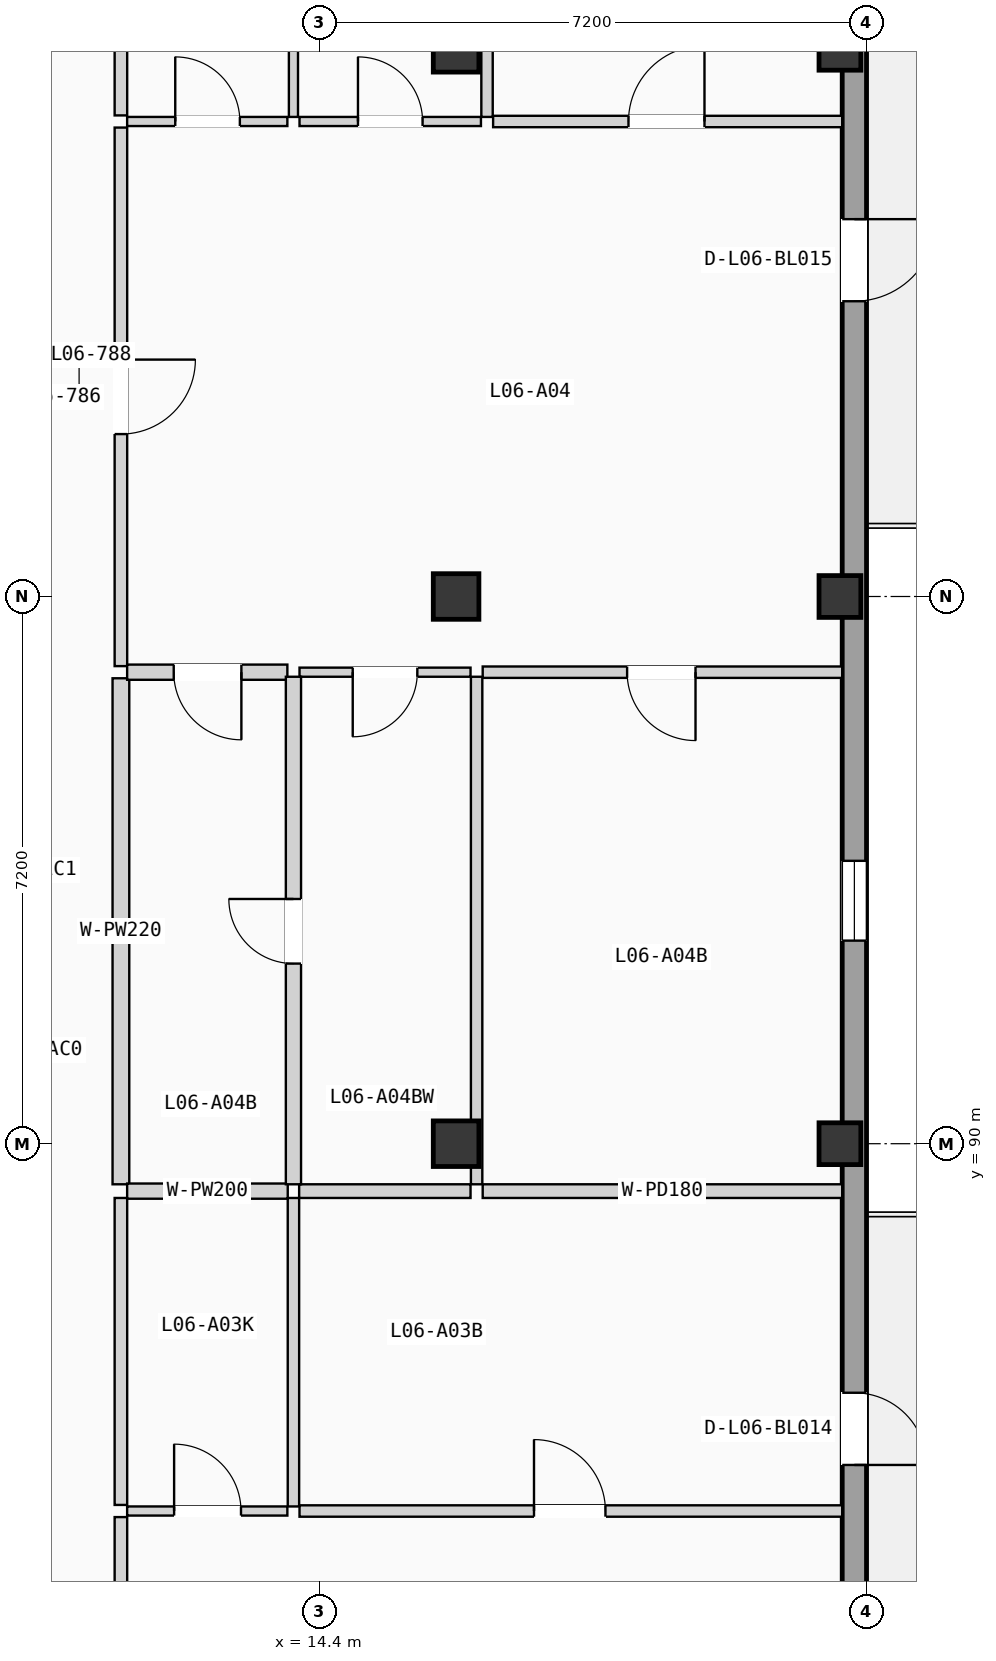
"""IFC4 building model, lengths in metres.
Left out: names, types, materials, properties, quantities, classifications, styles, units other than length and angle.
Written with IfcOpenShell. Run it as: python <this file> out.ifc"""

import sys

from ifc_helpers import new_model, si_unit, direction, frame, frame_2d, origin, origin_2d, place, context, subcontext, project, spatial, rectangle, extrude, element, fill, save


model = new_model("IFC4")
c1 = context("Model", 3, precision=1e-05, world=origin(), true_north=direction((0.0, 1.0)))
c2 = subcontext(c1, "Body", "Model", "MODEL_VIEW")
j1 = project(units=[si_unit("LENGTHUNIT", "METRE"), si_unit("PLANEANGLEUNIT", "RADIAN")], contexts=[c1])
p1 = place(None, origin())
s1 = spatial("IfcSite", under=j1, at=p1, CompositionType="ELEMENT")
p2 = place(p1, origin())
s2 = spatial("IfcBuilding", under=s1, at=p2, CompositionType="ELEMENT")
p3 = place(p2, frame((0.0, 0.0, 21.525)))
s3 = spatial("IfcBuildingStorey", under=s2, at=p3, CompositionType="ELEMENT", Elevation=21.525)
for number, where, z_axis, x_axis in (
    (1, (16.2, 90.0, 0.0), (0.0, 0.0, 1.0), (1.0, 0.0, 0.0)),
    (2, (16.2, 97.2, 0.0), (0.0, 0.0, 1.0), (1.0, 0.0, 0.0)),
    (3, (16.2, 104.4, 0.0), (0.0, 0.0, 1.0), (1.0, 0.0, 0.0)),
):
    element("IfcColumn", number, at=place(p3, frame(where, z_axis=z_axis, x_axis=x_axis)), inside=s3, PredefinedType="COLUMN", context=c2, shape_type="SweptSolid", body=[
        extrude(rectangle(XDim=0.6, YDim=0.6, at=origin_2d()), origin(), (0.0, 0.0, 1.0), 3.15),
    ])
for number, where, z_axis, x_axis in (
    (4, (21.25, 90.0, 0.0), (0.0, 0.0, 1.0), (1.0, 0.0, 0.0)),
    (5, (21.25, 97.2, 0.0), (0.0, 0.0, 1.0), (1.0, 0.0, 0.0)),
    (6, (21.25, 104.4, 0.0), (0.0, 0.0, 1.0), (1.0, 0.0, 0.0)),
):
    element("IfcColumn", number, at=place(p3, frame(where, z_axis=z_axis, x_axis=x_axis)), inside=s3, PredefinedType="COLUMN", context=c2, shape_type="SweptSolid", body=[
        extrude(rectangle(XDim=0.55, YDim=0.55, at=origin_2d()), origin(), (0.0, 0.0, 1.0), 3.15),
    ])
p4 = place(p3, frame((21.44, 68.72, 0.0), z_axis=(0.0, 0.0, 1.0), x_axis=(0.0, 1.0, 0.0)))
e7 = element("IfcWall", 7, at=p4, inside=s3, PredefinedType="SOLIDWALL", context=c2, shape_type="SweptSolid", body=[
    extrude(rectangle(XDim=49.76, YDim=0.32, at=frame_2d((24.88, 0.0))), origin(), (0.0, 0.0, 1.0), 2.89),
])
p5 = place(p4, frame((12.169, 0.0, 0.555)))
e8 = element("IfcOpeningElement", 8, at=p5, cuts=e7, PredefinedType="OPENING", context=c2, shape_type="SweptSolid", body=[
    extrude(rectangle(XDim=0.95, YDim=1.65, at=frame_2d((0.475, 0.825))), frame((0.0, 0.17, 0.0), z_axis=(0.0, -1.0, 0.0), x_axis=(1.0, 0.0, 0.0)), (0.0, 0.0, 1.0), 0.34),
])
p6 = place(p4, frame((8.825, 0.0, 0.85)))
e9 = element("IfcOpeningElement", 9, at=p6, cuts=e7, PredefinedType="OPENING", context=c2, shape_type="SweptSolid", body=[
    extrude(rectangle(XDim=0.95, YDim=1.2, at=frame_2d((0.475, 0.6))), frame((0.0, 0.17, 0.0), z_axis=(0.0, -1.0, 0.0), x_axis=(1.0, 0.0, 0.0)), (0.0, 0.0, 1.0), 0.34),
])
p7 = place(p4, frame((17.053, 0.0, 0.0)))
e10 = element("IfcOpeningElement", 10, at=p7, cuts=e7, PredefinedType="OPENING", context=c2, shape_type="SweptSolid", body=[
    extrude(rectangle(XDim=0.95, YDim=2.15, at=frame_2d((0.475, 1.075))), frame((0.0, 0.17, 0.0), z_axis=(0.0, -1.0, 0.0), x_axis=(1.0, 0.0, 0.0)), (0.0, 0.0, 1.0), 0.34),
])
p8 = place(p4, frame((32.365, 0.0, 0.0)))
e11 = element("IfcOpeningElement", 11, at=p8, cuts=e7, PredefinedType="OPENING", context=c2, shape_type="SweptSolid", body=[
    extrude(rectangle(XDim=1.08, YDim=2.18, at=frame_2d((0.54, 1.09))), frame((0.0, 0.17, 0.0), z_axis=(0.0, -1.0, 0.0), x_axis=(1.0, 0.0, 0.0)), (0.0, 0.0, 1.0), 0.34),
])
p9 = place(p4, frame((23.952, 0.0, 0.9)))
e12 = element("IfcOpeningElement", 12, at=p9, cuts=e7, PredefinedType="OPENING", context=c2, shape_type="SweptSolid", body=[
    extrude(rectangle(XDim=1.05, YDim=1.2, at=frame_2d((0.525, 0.6))), frame((0.0, 0.17, 0.0), z_axis=(0.0, -1.0, 0.0), x_axis=(1.0, 0.0, 0.0)), (0.0, 0.0, 1.0), 0.34),
])
p10 = place(p4, frame((38.69, 0.0, 0.855)))
e13 = element("IfcOpeningElement", 13, at=p10, cuts=e7, PredefinedType="OPENING", context=c2, shape_type="SweptSolid", body=[
    extrude(rectangle(XDim=1.05, YDim=1.35, at=frame_2d((0.525, 0.675))), frame((0.0, 0.17, 0.0), z_axis=(0.0, -1.0, 0.0), x_axis=(1.0, 0.0, 0.0)), (0.0, 0.0, 1.0), 0.34),
])
p11 = place(p3, frame((11.79, 80.199, 0.0), z_axis=(0.0, 0.0, 1.0), x_axis=(0.0, 1.0, 0.0)))
e14 = element("IfcWall", 14, at=p11, inside=s3, PredefinedType="PARTITIONING", context=c2, shape_type="SweptSolid", body=[
    extrude(rectangle(XDim=4.888, YDim=0.165, at=frame_2d((2.444, 0.0))), origin(), (0.0, 0.0, 1.0), 2.87),
])
p12 = place(p11, frame((1.954, 0.0, 0.0)))
e15 = element("IfcOpeningElement", 15, at=p12, cuts=e14, PredefinedType="OPENING", context=c2, shape_type="SweptSolid", body=[
    extrude(rectangle(XDim=0.98, YDim=2.08, at=frame_2d((0.49, 1.04))), frame((0.0, 0.093, 0.0), z_axis=(0.0, -1.0, 0.0), x_axis=(1.0, 0.0, 0.0)), (0.0, 0.0, 1.0), 0.185),
])
p13 = place(p3, frame((11.79, 85.247, 0.0), z_axis=(0.0, 0.0, 1.0), x_axis=(0.0, 1.0, 0.0)))
e16 = element("IfcWall", 16, at=p13, inside=s3, PredefinedType="PARTITIONING", context=c2, shape_type="SweptSolid", body=[
    extrude(rectangle(XDim=4.039, YDim=0.165, at=frame_2d((2.02, 0.0))), origin(), (0.0, 0.0, 1.0), 2.87),
])
p14 = place(p3, frame((11.79, 96.284, 0.0), z_axis=(0.0, 0.0, 1.0), x_axis=(0.0, 1.0, 0.0)))
e17 = element("IfcWall", 17, at=p14, inside=s3, PredefinedType="PARTITIONING", context=c2, shape_type="SweptSolid", body=[
    extrude(rectangle(XDim=7.086, YDim=0.165, at=frame_2d((3.543, 0.0))), origin(), (0.0, 0.0, 1.0), 2.87),
])
p15 = place(p14, frame((3.053, 0.0, 0.0)))
e18 = element("IfcOpeningElement", 18, at=p15, cuts=e17, PredefinedType="OPENING", context=c2, shape_type="SweptSolid", body=[
    extrude(rectangle(XDim=0.98, YDim=2.08, at=frame_2d((0.49, 1.04))), frame((0.0, 0.093, 0.0), z_axis=(0.0, -1.0, 0.0), x_axis=(1.0, 0.0, 0.0)), (0.0, 0.0, 1.0), 0.185),
])
p16 = place(p3, frame((11.79, 89.466, 0.0), z_axis=(0.0, 0.0, 1.0), x_axis=(0.0, 1.0, 0.0)))
e19 = element("IfcWall", 19, at=p16, inside=s3, PredefinedType="PLUMBINGWALL", context=c2, shape_type="SweptSolid", body=[
    extrude(rectangle(XDim=6.658, YDim=0.22, at=frame_2d((3.329, 0.0))), origin(), (0.0, 0.0, 1.0), 2.87),
])
p17 = place(p3, frame((11.79, 103.53, 0.0), z_axis=(0.0, 0.0, 1.0), x_axis=(0.0, 1.0, 0.0)))
e20 = element("IfcWall", 20, at=p17, inside=s3, PredefinedType="PARTITIONING", context=c2, shape_type="SweptSolid", body=[
    extrude(rectangle(XDim=7.67, YDim=0.165, at=frame_2d((3.835, 0.0))), origin(), (0.0, 0.0, 1.0), 2.87),
])
p18 = place(p3, frame((11.872, 85.167, 0.0), z_axis=(0.0, 0.0, 1.0), x_axis=(1.0, 0.0, 0.0)))
e21 = element("IfcWall", 21, at=p18, inside=s3, PredefinedType="PARTITIONING", context=c2, shape_type="SweptSolid", body=[
    extrude(rectangle(XDim=2.108, YDim=0.12, at=frame_2d((1.054, 0.0))), origin(), (0.0, 0.0, 1.0), 2.87),
])
p19 = place(p18, frame((0.618, 0.0, 0.0)))
e22 = element("IfcOpeningElement", 22, at=p19, cuts=e21, PredefinedType="OPENING", context=c2, shape_type="SweptSolid", body=[
    extrude(rectangle(XDim=0.88, YDim=2.02, at=frame_2d((0.44, 1.01))), frame((0.0, 0.07, 0.0), z_axis=(0.0, -1.0, 0.0), x_axis=(1.0, 0.0, 0.0)), (0.0, 0.0, 1.0), 0.14),
])
p20 = place(p3, frame((14.14, 85.167, 0.0), z_axis=(0.0, 0.0, 1.0), x_axis=(1.0, 0.0, 0.0)))
e23 = element("IfcWall", 23, at=p20, inside=s3, PredefinedType="PARTITIONING", context=c2, shape_type="SweptSolid", body=[
    extrude(rectangle(XDim=7.14, YDim=0.15, at=frame_2d((3.57, 0.0))), origin(), (0.0, 0.0, 1.0), 2.87),
])
p21 = place(p20, frame((3.085, 0.0, 0.0)))
e24 = element("IfcOpeningElement", 24, at=p21, cuts=e23, PredefinedType="OPENING", context=c2, shape_type="SweptSolid", body=[
    extrude(rectangle(XDim=0.94, YDim=2.06, at=frame_2d((0.47, 1.03))), frame((0.0, 0.085, 0.0), z_axis=(0.0, -1.0, 0.0), x_axis=(1.0, 0.0, 0.0)), (0.0, 0.0, 1.0), 0.17),
])
p22 = place(p3, frame((14.06, 85.227, 0.0), z_axis=(0.0, 0.0, 1.0), x_axis=(0.0, 1.0, 0.0)))
e25 = element("IfcWall", 25, at=p22, inside=s3, PredefinedType="PARTITIONING", context=c2, shape_type="SweptSolid", body=[
    extrude(rectangle(XDim=4.059, YDim=0.15, at=frame_2d((2.029, 0.0))), origin(), (0.0, 0.0, 1.0), 2.87),
])
p23 = place(p3, frame((11.872, 89.376, 0.0), z_axis=(0.0, 0.0, 1.0), x_axis=(1.0, 0.0, 0.0)))
e26 = element("IfcWall", 26, at=p23, inside=s3, PredefinedType="PLUMBINGWALL", context=c2, shape_type="SweptSolid", body=[
    extrude(rectangle(XDim=2.113, YDim=0.2, at=frame_2d((1.057, 0.0))), origin(), (0.0, 0.0, 1.0), 2.87),
])
p24 = place(p3, frame((16.55, 89.376, 0.0), z_axis=(0.0, 0.0, 1.0), x_axis=(1.0, 0.0, 0.0)))
e27 = element("IfcWall", 27, at=p24, inside=s3, PredefinedType="PARTITIONING", context=c2, shape_type="SweptSolid", body=[
    extrude(rectangle(XDim=4.73, YDim=0.18, at=frame_2d((2.365, 0.0))), origin(), (0.0, 0.0, 1.0), 2.87),
])
p25 = place(p3, frame((14.135, 89.376, 0.0), z_axis=(0.0, 0.0, 1.0), x_axis=(1.0, 0.0, 0.0)))
e28 = element("IfcWall", 28, at=p25, inside=s3, PredefinedType="PARTITIONING", context=c2, shape_type="SweptSolid", body=[
    extrude(rectangle(XDim=2.255, YDim=0.18, at=frame_2d((1.127, 0.0))), origin(), (0.0, 0.0, 1.0), 2.87),
])
p26 = place(p3, frame((11.872, 96.204, 0.0), z_axis=(0.0, 0.0, 1.0), x_axis=(1.0, 0.0, 0.0)))
e29 = element("IfcWall", 29, at=p26, inside=s3, PredefinedType="PLUMBINGWALL", context=c2, shape_type="SweptSolid", body=[
    extrude(rectangle(XDim=2.108, YDim=0.2, at=frame_2d((1.054, 0.0))), origin(), (0.0, 0.0, 1.0), 2.87),
])
p27 = place(p26, frame((0.613, 0.0, 0.0)))
e30 = element("IfcOpeningElement", 30, at=p27, cuts=e29, PredefinedType="OPENING", context=c2, shape_type="SweptSolid", body=[
    extrude(rectangle(XDim=0.89, YDim=2.03, at=frame_2d((0.445, 1.015))), frame((0.0, 0.11, 0.0), z_axis=(0.0, -1.0, 0.0), x_axis=(1.0, 0.0, 0.0)), (0.0, 0.0, 1.0), 0.22),
])
p28 = place(p3, frame((11.872, 103.45, 0.0), z_axis=(0.0, 0.0, 1.0), x_axis=(1.0, 0.0, 0.0)))
e31 = element("IfcWall", 31, at=p28, inside=s3, PredefinedType="PARTITIONING", context=c2, shape_type="SweptSolid", body=[
    extrude(rectangle(XDim=2.108, YDim=0.12, at=frame_2d((1.054, 0.0))), origin(), (0.0, 0.0, 1.0), 2.87),
])
p29 = place(p28, frame((0.633, 0.0, 0.0)))
e32 = element("IfcOpeningElement", 32, at=p29, cuts=e31, PredefinedType="OPENING", context=c2, shape_type="SweptSolid", body=[
    extrude(rectangle(XDim=0.85, YDim=2.01, at=frame_2d((0.425, 1.005))), frame((0.0, 0.07, 0.0), z_axis=(0.0, -1.0, 0.0), x_axis=(1.0, 0.0, 0.0)), (0.0, 0.0, 1.0), 0.14),
])
p30 = place(p3, frame((16.55, 96.204, 0.0), z_axis=(0.0, 0.0, 1.0), x_axis=(1.0, 0.0, 0.0)))
e33 = element("IfcWall", 33, at=p30, inside=s3, PredefinedType="PARTITIONING", context=c2, shape_type="SweptSolid", body=[
    extrude(rectangle(XDim=4.73, YDim=0.15, at=frame_2d((2.365, 0.0))), origin(), (0.0, 0.0, 1.0), 2.87),
])
p31 = place(p30, frame((1.9, 0.0, 0.0)))
e34 = element("IfcOpeningElement", 34, at=p31, cuts=e33, PredefinedType="OPENING", context=c2, shape_type="SweptSolid", body=[
    extrude(rectangle(XDim=0.9, YDim=2.04, at=frame_2d((0.45, 1.02))), frame((0.0, 0.085, 0.0), z_axis=(0.0, -1.0, 0.0), x_axis=(1.0, 0.0, 0.0)), (0.0, 0.0, 1.0), 0.17),
])
p32 = place(p3, frame((14.14, 96.204, 0.0), z_axis=(0.0, 0.0, 1.0), x_axis=(1.0, 0.0, 0.0)))
e35 = element("IfcWall", 35, at=p32, inside=s3, PredefinedType="PARTITIONING", context=c2, shape_type="SweptSolid", body=[
    extrude(rectangle(XDim=2.25, YDim=0.12, at=frame_2d((1.125, 0.0))), origin(), (0.0, 0.0, 1.0), 2.87),
])
p33 = place(p32, frame((0.7, 0.0, 0.0)))
e36 = element("IfcOpeningElement", 36, at=p33, cuts=e35, PredefinedType="OPENING", context=c2, shape_type="SweptSolid", body=[
    extrude(rectangle(XDim=0.85, YDim=2.01, at=frame_2d((0.425, 1.005))), frame((0.0, 0.07, 0.0), z_axis=(0.0, -1.0, 0.0), x_axis=(1.0, 0.0, 0.0)), (0.0, 0.0, 1.0), 0.14),
])
p34 = place(p3, frame((16.687, 103.45, 0.0), z_axis=(0.0, 0.0, 1.0), x_axis=(1.0, 0.0, 0.0)))
e37 = element("IfcWall", 37, at=p34, inside=s3, PredefinedType="PARTITIONING", context=c2, shape_type="SweptSolid", body=[
    extrude(rectangle(XDim=4.593, YDim=0.15, at=frame_2d((2.296, 0.0))), origin(), (0.0, 0.0, 1.0), 2.87),
])
p35 = place(p34, frame((1.781, 0.0, 0.0)))
e38 = element("IfcOpeningElement", 38, at=p35, cuts=e37, PredefinedType="OPENING", context=c2, shape_type="SweptSolid", body=[
    extrude(rectangle(XDim=1.0, YDim=2.06, at=frame_2d((0.5, 1.03))), frame((0.0, 0.085, 0.0), z_axis=(0.0, -1.0, 0.0), x_axis=(1.0, 0.0, 0.0)), (0.0, 0.0, 1.0), 0.17),
])
p36 = place(p3, frame((14.14, 103.45, 0.0), z_axis=(0.0, 0.0, 1.0), x_axis=(1.0, 0.0, 0.0)))
e39 = element("IfcWall", 39, at=p36, inside=s3, PredefinedType="PARTITIONING", context=c2, shape_type="SweptSolid", body=[
    extrude(rectangle(XDim=2.387, YDim=0.12, at=frame_2d((1.194, 0.0))), origin(), (0.0, 0.0, 1.0), 2.87),
])
p37 = place(p36, frame((0.769, 0.0, 0.0)))
e40 = element("IfcOpeningElement", 40, at=p37, cuts=e39, PredefinedType="OPENING", context=c2, shape_type="SweptSolid", body=[
    extrude(rectangle(XDim=0.85, YDim=2.01, at=frame_2d((0.425, 1.005))), frame((0.0, 0.07, 0.0), z_axis=(0.0, -1.0, 0.0), x_axis=(1.0, 0.0, 0.0)), (0.0, 0.0, 1.0), 0.14),
])
p38 = place(p3, frame((14.06, 89.466, 0.0), z_axis=(0.0, 0.0, 1.0), x_axis=(0.0, 1.0, 0.0)))
e41 = element("IfcWall", 41, at=p38, inside=s3, PredefinedType="PLUMBINGWALL", context=c2, shape_type="SweptSolid", body=[
    extrude(rectangle(XDim=6.678, YDim=0.2, at=frame_2d((3.339, 0.0))), origin(), (0.0, 0.0, 1.0), 2.87),
])
p39 = place(p38, frame((2.904, 0.0, 0.0)))
e42 = element("IfcOpeningElement", 42, at=p39, cuts=e41, PredefinedType="OPENING", context=c2, shape_type="SweptSolid", body=[
    extrude(rectangle(XDim=0.85, YDim=2.01, at=frame_2d((0.425, 1.005))), frame((0.0, 0.11, 0.0), z_axis=(0.0, -1.0, 0.0), x_axis=(1.0, 0.0, 0.0)), (0.0, 0.0, 1.0), 0.22),
])
p40 = place(p3, frame((14.06, 103.51, 0.0), z_axis=(0.0, 0.0, 1.0), x_axis=(0.0, 1.0, 0.0)))
e43 = element("IfcWall", 43, at=p40, inside=s3, PredefinedType="PARTITIONING", context=c2, shape_type="SweptSolid", body=[
    extrude(rectangle(XDim=7.69, YDim=0.12, at=frame_2d((3.845, 0.0))), origin(), (0.0, 0.0, 1.0), 2.87),
])
p41 = place(p3, frame((16.47, 89.466, 0.0), z_axis=(0.0, 0.0, 1.0), x_axis=(0.0, 1.0, 0.0)))
e44 = element("IfcWall", 44, at=p41, inside=s3, PredefinedType="PARTITIONING", context=c2, shape_type="SweptSolid", body=[
    extrude(rectangle(XDim=6.678, YDim=0.15, at=frame_2d((3.339, 0.0))), origin(), (0.0, 0.0, 1.0), 2.87),
])
p42 = place(p3, frame((16.607, 103.51, 0.0), z_axis=(0.0, 0.0, 1.0), x_axis=(0.0, 1.0, 0.0)))
e45 = element("IfcWall", 45, at=p42, inside=s3, PredefinedType="PARTITIONING", context=c2, shape_type="SweptSolid", body=[
    extrude(rectangle(XDim=7.69, YDim=0.15, at=frame_2d((3.845, 0.0))), origin(), (0.0, 0.0, 1.0), 2.87),
])
p43 = place(p7, frame((0.95, 0.0, 0.0), z_axis=(0.0, 0.0, 1.0), x_axis=(-1.0, 0.0, 0.0)))
e46 = element("IfcDoor", 46, at=p43, inside=s3, OperationType="SINGLE_SWING_LEFT", PredefinedType="DOOR", context=c2, shape_type="SweptSolid", body=[
    extrude(rectangle(XDim=0.95, YDim=2.15, at=frame_2d((0.475, 1.075))), frame((0.0, 0.025, 0.0), z_axis=(0.0, -1.0, 0.0), x_axis=(1.0, 0.0, 0.0)), (0.0, 0.0, 1.0), 0.05),
])
fill(e10, e46)
p44 = place(p8, frame((1.08, 0.0, 0.0), z_axis=(0.0, 0.0, 1.0), x_axis=(-1.0, 0.0, 0.0)))
e47 = element("IfcDoor", 47, at=p44, inside=s3, OperationType="SINGLE_SWING_RIGHT", PredefinedType="DOOR", context=c2, shape_type="SweptSolid", body=[
    extrude(rectangle(XDim=1.08, YDim=2.18, at=frame_2d((0.54, 1.09))), frame((0.0, 0.025, 0.0), z_axis=(0.0, -1.0, 0.0), x_axis=(1.0, 0.0, 0.0)), (0.0, 0.0, 1.0), 0.05),
])
fill(e11, e47)
p45 = place(p9, origin())
e48 = element("IfcWindow", 48, at=p45, inside=s3, PartitioningType="SINGLE_PANEL", PredefinedType="WINDOW", context=c2, shape_type="SweptSolid", body=[
    extrude(rectangle(XDim=1.05, YDim=1.2, at=frame_2d((0.525, 0.6))), frame((0.0, 0.03, 0.0), z_axis=(0.0, -1.0, 0.0), x_axis=(1.0, 0.0, 0.0)), (0.0, 0.0, 1.0), 0.06),
])
fill(e12, e48)
p46 = place(p15, frame((0.98, 0.0, 0.0), z_axis=(0.0, 0.0, 1.0), x_axis=(-1.0, 0.0, 0.0)))
e49 = element("IfcDoor", 49, at=p46, inside=s3, OperationType="SINGLE_SWING_RIGHT", PredefinedType="DOOR", context=c2, shape_type="SweptSolid", body=[
    extrude(rectangle(XDim=0.98, YDim=2.08, at=frame_2d((0.49, 1.04))), frame((0.0, 0.025, 0.0), z_axis=(0.0, -1.0, 0.0), x_axis=(1.0, 0.0, 0.0)), (0.0, 0.0, 1.0), 0.05),
])
fill(e18, e49)
p47 = place(p19, origin())
e50 = element("IfcDoor", 50, at=p47, inside=s3, OperationType="SINGLE_SWING_LEFT", PredefinedType="DOOR", context=c2, shape_type="SweptSolid", body=[
    extrude(rectangle(XDim=0.88, YDim=2.02, at=frame_2d((0.44, 1.01))), frame((0.0, 0.025, 0.0), z_axis=(0.0, -1.0, 0.0), x_axis=(1.0, 0.0, 0.0)), (0.0, 0.0, 1.0), 0.05),
])
fill(e22, e50)
p48 = place(p21, origin())
e51 = element("IfcDoor", 51, at=p48, inside=s3, OperationType="SINGLE_SWING_LEFT", PredefinedType="DOOR", context=c2, shape_type="SweptSolid", body=[
    extrude(rectangle(XDim=0.94, YDim=2.06, at=frame_2d((0.47, 1.03))), frame((0.0, 0.025, 0.0), z_axis=(0.0, -1.0, 0.0), x_axis=(1.0, 0.0, 0.0)), (0.0, 0.0, 1.0), 0.05),
])
fill(e24, e51)
p49 = place(p27, frame((0.89, 0.0, 0.0), z_axis=(0.0, 0.0, 1.0), x_axis=(-1.0, 0.0, 0.0)))
e52 = element("IfcDoor", 52, at=p49, inside=s3, OperationType="SINGLE_SWING_RIGHT", PredefinedType="DOOR", context=c2, shape_type="SweptSolid", body=[
    extrude(rectangle(XDim=0.89, YDim=2.03, at=frame_2d((0.445, 1.015))), frame((0.0, 0.025, 0.0), z_axis=(0.0, -1.0, 0.0), x_axis=(1.0, 0.0, 0.0)), (0.0, 0.0, 1.0), 0.05),
])
fill(e30, e52)
p50 = place(p29, origin())
e53 = element("IfcDoor", 53, at=p50, inside=s3, OperationType="SINGLE_SWING_LEFT", PredefinedType="DOOR", context=c2, shape_type="SweptSolid", body=[
    extrude(rectangle(XDim=0.85, YDim=2.01, at=frame_2d((0.425, 1.005))), frame((0.0, 0.025, 0.0), z_axis=(0.0, -1.0, 0.0), x_axis=(1.0, 0.0, 0.0)), (0.0, 0.0, 1.0), 0.05),
])
fill(e32, e53)
p51 = place(p31, frame((0.9, 0.0, 0.0), z_axis=(0.0, 0.0, 1.0), x_axis=(-1.0, 0.0, 0.0)))
e54 = element("IfcDoor", 54, at=p51, inside=s3, OperationType="SINGLE_SWING_RIGHT", PredefinedType="DOOR", context=c2, shape_type="SweptSolid", body=[
    extrude(rectangle(XDim=0.9, YDim=2.04, at=frame_2d((0.45, 1.02))), frame((0.0, 0.025, 0.0), z_axis=(0.0, -1.0, 0.0), x_axis=(1.0, 0.0, 0.0)), (0.0, 0.0, 1.0), 0.05),
])
fill(e34, e54)
p52 = place(p33, frame((0.85, 0.0, 0.0), z_axis=(0.0, 0.0, 1.0), x_axis=(-1.0, 0.0, 0.0)))
e55 = element("IfcDoor", 55, at=p52, inside=s3, OperationType="SINGLE_SWING_LEFT", PredefinedType="DOOR", context=c2, shape_type="SweptSolid", body=[
    extrude(rectangle(XDim=0.85, YDim=2.01, at=frame_2d((0.425, 1.005))), frame((0.0, 0.025, 0.0), z_axis=(0.0, -1.0, 0.0), x_axis=(1.0, 0.0, 0.0)), (0.0, 0.0, 1.0), 0.05),
])
fill(e36, e55)
p53 = place(p35, origin())
e56 = element("IfcDoor", 56, at=p53, inside=s3, OperationType="SINGLE_SWING_RIGHT", PredefinedType="DOOR", context=c2, shape_type="SweptSolid", body=[
    extrude(rectangle(XDim=1.0, YDim=2.06, at=frame_2d((0.5, 1.03))), frame((0.0, 0.025, 0.0), z_axis=(0.0, -1.0, 0.0), x_axis=(1.0, 0.0, 0.0)), (0.0, 0.0, 1.0), 0.05),
])
fill(e38, e56)
p54 = place(p37, origin())
e57 = element("IfcDoor", 57, at=p54, inside=s3, OperationType="SINGLE_SWING_LEFT", PredefinedType="DOOR", context=c2, shape_type="SweptSolid", body=[
    extrude(rectangle(XDim=0.85, YDim=2.01, at=frame_2d((0.425, 1.005))), frame((0.0, 0.025, 0.0), z_axis=(0.0, -1.0, 0.0), x_axis=(1.0, 0.0, 0.0)), (0.0, 0.0, 1.0), 0.05),
])
fill(e40, e57)
p55 = place(p39, origin())
e58 = element("IfcDoor", 58, at=p55, inside=s3, OperationType="SINGLE_SWING_RIGHT", PredefinedType="DOOR", context=c2, shape_type="SweptSolid", body=[
    extrude(rectangle(XDim=0.85, YDim=2.01, at=frame_2d((0.425, 1.005))), frame((0.0, 0.025, 0.0), z_axis=(0.0, -1.0, 0.0), x_axis=(1.0, 0.0, 0.0)), (0.0, 0.0, 1.0), 0.05),
])
fill(e42, e58)
save(model, sys.argv[1])
